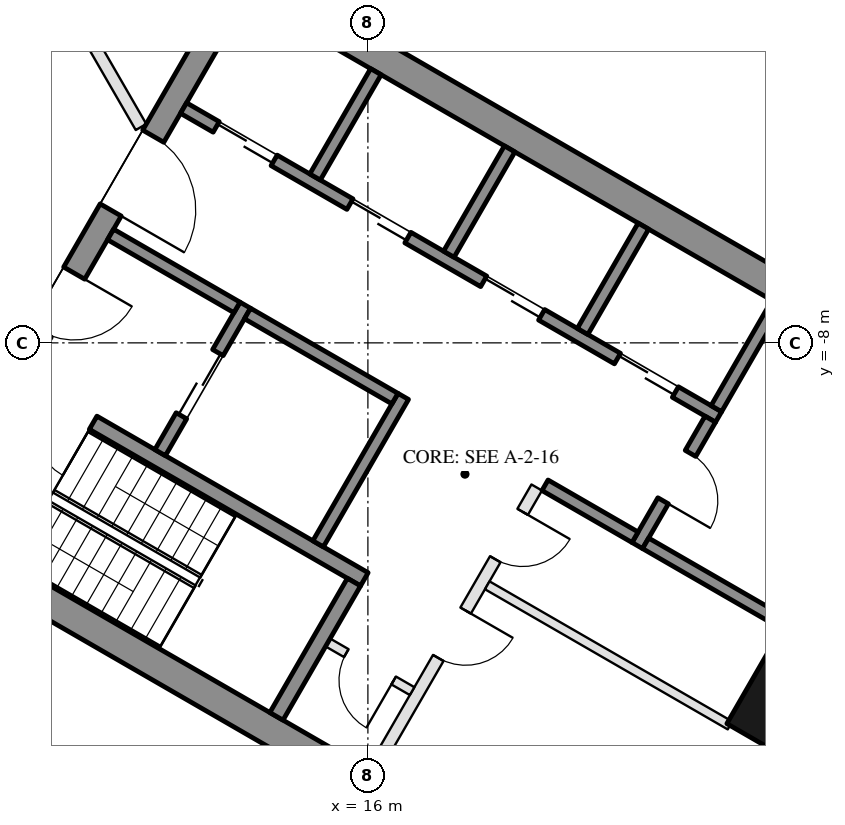
"""IFC4 building model, lengths in metres.
Left out: names, types, materials, properties, quantities, classifications, styles, units other than length and angle.
Written with IfcOpenShell. Run it as: python <this file> out.ifc"""

import sys

from ifc_helpers import new_model, si_unit, direction, frame, frame_2d, origin, origin_2d, place, context, subcontext, project, spatial, rectangle, hollow_rectangle, extrude, element, fill, save


model = new_model("IFC4")
c1 = context("Model", 3, precision=1e-05, world=origin(), true_north=direction((0.0, 1.0)))
c2 = subcontext(c1, "Body", "Model", "MODEL_VIEW")
j1 = project(units=[si_unit("LENGTHUNIT", "METRE"), si_unit("PLANEANGLEUNIT", "RADIAN")], contexts=[c1])
p1 = place(None, origin())
s1 = spatial("IfcSite", under=j1, at=p1, CompositionType="ELEMENT")
p2 = place(p1, origin())
s2 = spatial("IfcBuilding", under=s1, at=p2, CompositionType="ELEMENT")
p3 = place(p2, frame((0.0, 0.0, 79.8)))
s3 = spatial("IfcBuildingStorey", under=s2, at=p3, CompositionType="ELEMENT", Elevation=79.8)
p4 = place(p3, frame((23.643, -13.65, 0.0), z_axis=(0.0, 0.0, 1.0), x_axis=(0.5, 0.866025403784, 0.0)))
e1 = element("IfcColumn", 1, at=p4, inside=s3, PredefinedType="COLUMN", context=c2, shape_type="SweptSolid", body=[
    extrude(hollow_rectangle(XDim=2.8, YDim=2.4, WallThickness=0.07, at=origin_2d()), origin(), (0.0, 0.0, 1.0), 3.7),
])
p5 = place(p3, frame((26.257, -6.567, 0.0), z_axis=(0.0, 0.0, 1.0), x_axis=(-0.500023526245, 0.866011820475, 0.0)))
e2 = element("IfcWall", 2, at=p5, inside=s3, PredefinedType="SOLIDWALL", context=c2, shape_type="SweptSolid", body=[
    extrude(rectangle(XDim=11.816, YDim=0.35, at=frame_2d((5.908, 0.0))), origin(), (0.0, 0.0, 1.0), 3.55),
])
p6 = place(p5, frame((0.38, 0.0, 0.3)))
e3 = element("IfcOpeningElement", 3, at=p6, cuts=e2, PredefinedType="OPENING", context=c2, shape_type="SweptSolid", body=[
    extrude(rectangle(XDim=1.7, YDim=2.65, at=frame_2d((0.85, 1.325))), frame((0.0, 0.185, 0.0), z_axis=(0.0, -1.0, 0.0), x_axis=(1.0, 0.0, 0.0)), (0.0, 0.0, 1.0), 0.37),
])
p7 = place(p5, frame((7.666, 0.0, 0.0)))
e4 = element("IfcOpeningElement", 4, at=p7, cuts=e2, PredefinedType="OPENING", context=c2, shape_type="SweptSolid", body=[
    extrude(rectangle(XDim=2.4, YDim=2.4, at=frame_2d((1.2, 1.2))), frame((0.0, 0.185, 0.0), z_axis=(0.0, -1.0, 0.0), x_axis=(1.0, 0.0, 0.0)), (0.0, 0.0, 1.0), 0.37),
])
p8 = place(p5, frame((3.865, 0.0, 0.3)))
e5 = element("IfcOpeningElement", 5, at=p8, cuts=e2, PredefinedType="OPENING", context=c2, shape_type="SweptSolid", body=[
    extrude(rectangle(XDim=1.6, YDim=2.65, at=frame_2d((0.8, 1.325))), frame((0.0, 0.185, 0.0), z_axis=(0.0, -1.0, 0.0), x_axis=(1.0, 0.0, 0.0)), (0.0, 0.0, 1.0), 0.37),
])
p9 = place(p5, frame((5.765, 0.0, 0.3)))
e6 = element("IfcOpeningElement", 6, at=p9, cuts=e2, PredefinedType="OPENING", context=c2, shape_type="SweptSolid", body=[
    extrude(rectangle(XDim=1.6, YDim=2.65, at=frame_2d((0.8, 1.325))), frame((0.0, 0.185, 0.0), z_axis=(0.0, -1.0, 0.0), x_axis=(1.0, 0.0, 0.0)), (0.0, 0.0, 1.0), 0.37),
])
for number, where, z_axis, x_axis in (
    (7, (8.547, -10.997, 0.0), (0.0, 0.0, 1.0), (0.866, -0.5, 0.0)),
    (8, (13.797, -1.903, 0.0), (0.0, 0.0, 1.0), (0.866, -0.5, 0.0)),
):
    element("IfcWall", number, at=place(p3, frame(where, z_axis=z_axis, x_axis=x_axis)), inside=s3, PredefinedType="SHEAR", context=c2, shape_type="SweptSolid", body=[
        extrude(rectangle(XDim=14.837, YDim=0.5, at=frame_2d((7.418, 0.0))), origin(), (0.0, 0.0, 1.0), 3.5),
    ])
p10 = place(p3, frame((8.845, -10.88, 0.0), z_axis=(0.0, 0.0, 1.0), x_axis=(0.500004234368, 0.866022959057, 0.0)))
e9 = element("IfcWall", 9, at=p10, inside=s3, PredefinedType="SHEAR", context=c2, shape_type="SweptSolid", body=[
    extrude(rectangle(XDim=10.0, YDim=0.4, at=frame_2d((5.0, 0.0))), origin(), (0.0, 0.0, 1.0), 3.5),
])
p11 = place(p10, frame((3.55, 0.0, 0.0)))
e10 = element("IfcOpeningElement", 10, at=p11, cuts=e9, PredefinedType="OPENING", context=c2, shape_type="SweptSolid", body=[
    extrude(rectangle(XDim=1.1, YDim=2.1, at=frame_2d((0.55, 1.05))), frame((0.0, 0.21, 0.0), z_axis=(0.0, -1.0, 0.0), x_axis=(1.0, 0.0, 0.0)), (0.0, 0.0, 1.0), 0.42),
])
p12 = place(p10, frame((5.85, 0.0, 0.0)))
e11 = element("IfcOpeningElement", 11, at=p12, cuts=e9, PredefinedType="OPENING", context=c2, shape_type="SweptSolid", body=[
    extrude(rectangle(XDim=1.4, YDim=2.1, at=frame_2d((0.7, 1.05))), frame((0.0, 0.21, 0.0), z_axis=(0.0, -1.0, 0.0), x_axis=(1.0, 0.0, 0.0)), (0.0, 0.0, 1.0), 0.42),
])
p13 = place(p3, frame((10.356, -8.664, 0.0), z_axis=(0.0, 0.0, 1.0), x_axis=(0.866028629588, -0.499994412703, 0.0)))
e12 = element("IfcWall", 12, at=p13, inside=s3, PredefinedType="SHEAR", context=c2, shape_type="SweptSolid", body=[
    extrude(rectangle(XDim=6.45, YDim=0.25, at=frame_2d((3.225, 0.0))), origin(), (0.0, 0.0, 1.0), 3.5),
])
p14 = place(p13, frame((0.3, 0.0, 0.0)))
e13 = element("IfcOpeningElement", 13, at=p14, cuts=e12, PredefinedType="OPENING", context=c2, shape_type="SweptSolid", body=[
    extrude(rectangle(XDim=1.0, YDim=2.1, at=frame_2d((0.5, 1.05))), frame((0.0, 0.135, 0.0), z_axis=(0.0, -1.0, 0.0), x_axis=(1.0, 0.0, 0.0)), (0.0, 0.0, 1.0), 0.27),
])
p15 = place(p3, frame((14.496, -14.143, 0.0), z_axis=(0.0, 0.0, 1.0), x_axis=(0.500062241894, 0.865989465428, 0.0)))
e14 = element("IfcWall", 14, at=p15, inside=s3, PredefinedType="SHEAR", context=c2, shape_type="SweptSolid", body=[
    extrude(rectangle(XDim=2.55, YDim=0.25, at=frame_2d((1.275, 0.0))), origin(), (0.0, 0.0, 1.0), 3.5),
])
p16 = place(p3, frame((15.181, -11.305, 0.0), z_axis=(0.0, 0.0, 1.0), x_axis=(0.49994636267, 0.866056369097, 0.0)))
e15 = element("IfcWall", 15, at=p16, inside=s3, PredefinedType="SHEAR", context=c2, shape_type="SweptSolid", body=[
    extrude(rectangle(XDim=2.8, YDim=0.2, at=frame_2d((1.4, 0.0))), origin(), (0.0, 0.0, 1.0), 3.5),
])
p17 = place(p3, frame((12.583, -9.805, 0.0), z_axis=(0.0, 0.0, 1.0), x_axis=(0.49994636267, 0.866056369097, 0.0)))
e16 = element("IfcWall", 16, at=p17, inside=s3, PredefinedType="SHEAR", context=c2, shape_type="SweptSolid", body=[
    extrude(rectangle(XDim=2.8, YDim=0.2, at=frame_2d((1.4, 0.0))), origin(), (0.0, 0.0, 1.0), 3.5),
])
p18 = place(p17, frame((0.7, 0.0, 0.0)))
e17 = element("IfcOpeningElement", 17, at=p18, cuts=e16, PredefinedType="OPENING", context=c2, shape_type="SweptSolid", body=[
    extrude(rectangle(XDim=1.2, YDim=2.1, at=frame_2d((0.6, 1.05))), frame((0.0, 0.11, 0.0), z_axis=(0.0, -1.0, 0.0), x_axis=(1.0, 0.0, 0.0)), (0.0, 0.0, 1.0), 0.22),
])
p19 = place(p3, frame((11.768, -6.217, 0.0), z_axis=(0.0, 0.0, 1.0), x_axis=(0.866050077142, -0.499957262057, 0.0)))
e18 = element("IfcWall", 18, at=p19, inside=s3, PredefinedType="SHEAR", context=c2, shape_type="SweptSolid", body=[
    extrude(rectangle(XDim=2.4, YDim=0.2, at=frame_2d((1.2, 0.0))), origin(), (0.0, 0.0, 1.0), 3.5),
])
p20 = place(p3, frame((14.02, -7.517, 0.0), z_axis=(0.0, 0.0, 1.0), x_axis=(0.866034573852, -0.49998411664, 0.0)))
e19 = element("IfcWall", 19, at=p20, inside=s3, PredefinedType="SHEAR", context=c2, shape_type="SweptSolid", body=[
    extrude(rectangle(XDim=2.8, YDim=0.2, at=frame_2d((1.4, 0.0))), origin(), (0.0, 0.0, 1.0), 3.5),
])
p21 = place(p3, frame((12.968, -4.138, 0.0), z_axis=(0.0, 0.0, 1.0), x_axis=(0.866028328073, -0.49999493495, 0.0)))
e20 = element("IfcWall", 20, at=p21, inside=s3, PredefinedType="SHEAR", context=c2, shape_type="SweptSolid", body=[
    extrude(rectangle(XDim=10.16, YDim=0.2, at=frame_2d((5.08, 0.0))), origin(), (0.0, 0.0, 1.0), 3.5),
])
p22 = place(p21, frame((0.62, 0.0, 0.0)))
e21 = element("IfcOpeningElement", 21, at=p22, cuts=e20, PredefinedType="OPENING", context=c2, shape_type="SweptSolid", body=[
    extrude(rectangle(XDim=1.1, YDim=2.1, at=frame_2d((0.55, 1.05))), frame((0.0, 0.11, 0.0), z_axis=(0.0, -1.0, 0.0), x_axis=(1.0, 0.0, 0.0)), (0.0, 0.0, 1.0), 0.22),
])
p23 = place(p21, frame((3.16, 0.0, 0.0)))
e22 = element("IfcOpeningElement", 22, at=p23, cuts=e20, PredefinedType="OPENING", context=c2, shape_type="SweptSolid", body=[
    extrude(rectangle(XDim=1.1, YDim=2.1, at=frame_2d((0.55, 1.05))), frame((0.0, 0.11, 0.0), z_axis=(0.0, -1.0, 0.0), x_axis=(1.0, 0.0, 0.0)), (0.0, 0.0, 1.0), 0.22),
])
p24 = place(p21, frame((5.7, 0.0, 0.0)))
e23 = element("IfcOpeningElement", 23, at=p24, cuts=e20, PredefinedType="OPENING", context=c2, shape_type="SweptSolid", body=[
    extrude(rectangle(XDim=1.1, YDim=2.1, at=frame_2d((0.55, 1.05))), frame((0.0, 0.11, 0.0), z_axis=(0.0, -1.0, 0.0), x_axis=(1.0, 0.0, 0.0)), (0.0, 0.0, 1.0), 0.22),
])
p25 = place(p21, frame((8.24, 0.0, 0.0)))
e24 = element("IfcOpeningElement", 24, at=p25, cuts=e20, PredefinedType="OPENING", context=c2, shape_type="SweptSolid", body=[
    extrude(rectangle(XDim=1.1, YDim=2.1, at=frame_2d((0.55, 1.05))), frame((0.0, 0.11, 0.0), z_axis=(0.0, -1.0, 0.0), x_axis=(1.0, 0.0, 0.0)), (0.0, 0.0, 1.0), 0.22),
])
p26 = place(p3, frame((20.43, -11.333, 0.0), z_axis=(0.0, 0.0, 1.0), x_axis=(0.500001309137, 0.866024647952, 0.0)))
e25 = element("IfcWall", 25, at=p26, inside=s3, PredefinedType="SHEAR", context=c2, shape_type="SweptSolid", body=[
    extrude(rectangle(XDim=2.4, YDim=0.2, at=frame_2d((1.2, 0.0))), origin(), (0.0, 0.0, 1.0), 3.5),
])
p27 = place(p26, frame((0.85, 0.0, 0.0)))
e26 = element("IfcOpeningElement", 26, at=p27, cuts=e25, PredefinedType="OPENING", context=c2, shape_type="SweptSolid", body=[
    extrude(rectangle(XDim=0.9, YDim=2.1, at=frame_2d((0.45, 1.05))), frame((0.0, 0.11, 0.0), z_axis=(0.0, -1.0, 0.0), x_axis=(1.0, 0.0, 0.0)), (0.0, 0.0, 1.0), 0.22),
])
p28 = place(p3, frame((18.913, -10.342, 0.0), z_axis=(0.0, 0.0, 1.0), x_axis=(0.866038183914, -0.499977863513, 0.0)))
e27 = element("IfcWall", 27, at=p28, inside=s3, PredefinedType="SHEAR", context=c2, shape_type="SweptSolid", body=[
    extrude(rectangle(XDim=1.71, YDim=0.2, at=frame_2d((0.855, 0.0))), origin(), (0.0, 0.0, 1.0), 3.5),
])
for number, where, z_axis, x_axis in (
    (28, (15.131, -5.272, 0.0), (0.0, 0.0, 1.0), (0.5, 0.866, 0.0)),
    (29, (17.331, -6.542, 0.0), (0.0, 0.0, 1.0), (0.5, 0.866, 0.0)),
    (30, (19.531, -7.812, 0.0), (0.0, 0.0, 1.0), (0.5, 0.866, 0.0)),
    (31, (21.73, -9.082, 0.0), (0.0, 0.0, 1.0), (0.5, 0.866, 0.0)),
):
    element("IfcWall", number, at=place(p3, frame(where, z_axis=z_axis, x_axis=x_axis)), inside=s3, PredefinedType="SHEAR", context=c2, shape_type="SweptSolid", body=[
        extrude(rectangle(XDim=2.0, YDim=0.2, at=frame_2d((1.0, 0.0))), origin(), (0.0, 0.0, 1.0), 3.5),
    ])
p29 = place(p3, frame((20.567, -11.297, 0.0), z_axis=(0.0, 0.0, 1.0), x_axis=(0.866060851709, -0.499938597367, 0.0)))
e32 = element("IfcWall", 32, at=p29, inside=s3, PredefinedType="SHEAR", context=c2, shape_type="SweptSolid", body=[
    extrude(rectangle(XDim=2.64, YDim=0.2, at=frame_2d((1.32, 0.0))), origin(), (0.0, 0.0, 1.0), 3.5),
])
p30 = place(p3, frame((16.076, -15.055, 0.0), z_axis=(0.0, 0.0, 1.0), x_axis=(0.499995103361, 0.866028230842, 0.0)))
e33 = element("IfcWall", 33, at=p30, inside=s3, PredefinedType="PARTITIONING", context=c2, shape_type="SweptSolid", body=[
    extrude(rectangle(XDim=5.4, YDim=0.2, at=frame_2d((2.7, 0.0))), origin(), (0.0, 0.0, 1.0), 3.5),
])
p31 = place(p30, frame((2.163, 0.0, 0.0)))
e34 = element("IfcOpeningElement", 34, at=p31, cuts=e33, PredefinedType="OPENING", context=c2, shape_type="SweptSolid", body=[
    extrude(rectangle(XDim=0.9, YDim=2.1, at=frame_2d((0.45, 1.05))), frame((0.0, 0.11, 0.0), z_axis=(0.0, -1.0, 0.0), x_axis=(1.0, 0.0, 0.0)), (0.0, 0.0, 1.0), 0.22),
])
p32 = place(p30, frame((4.038, 0.0, 0.0)))
e35 = element("IfcOpeningElement", 35, at=p32, cuts=e33, PredefinedType="OPENING", context=c2, shape_type="SweptSolid", body=[
    extrude(rectangle(XDim=0.9, YDim=2.1, at=frame_2d((0.45, 1.05))), frame((0.0, 0.11, 0.0), z_axis=(0.0, -1.0, 0.0), x_axis=(1.0, 0.0, 0.0)), (0.0, 0.0, 1.0), 0.22),
])
p33 = place(p3, frame((15.342, -12.928, 0.0), z_axis=(0.0, 0.0, 1.0), x_axis=(0.865989903783, -0.500061482766, 0.0)))
e36 = element("IfcWall", 36, at=p33, inside=s3, PredefinedType="PARTITIONING", context=c2, shape_type="SweptSolid", body=[
    extrude(rectangle(XDim=1.6, YDim=0.15, at=frame_2d((0.8, 0.0))), origin(), (0.0, 0.0, 1.0), 3.5),
])
p34 = place(p33, frame((0.35, 0.0, 0.0)))
e37 = element("IfcOpeningElement", 37, at=p34, cuts=e36, PredefinedType="OPENING", context=c2, shape_type="SweptSolid", body=[
    extrude(rectangle(XDim=0.9, YDim=2.1, at=frame_2d((0.45, 1.05))), frame((0.0, 0.085, 0.0), z_axis=(0.0, -1.0, 0.0), x_axis=(1.0, 0.0, 0.0)), (0.0, 0.0, 1.0), 0.17),
])
p35 = place(p3, frame((17.963, -11.987, 0.0), z_axis=(0.0, 0.0, 1.0), x_axis=(0.865998608524, -0.500046407882, 0.0)))
e38 = element("IfcWall", 38, at=p35, inside=s3, PredefinedType="PARTITIONING", context=c2, shape_type="SweptSolid", body=[
    extrude(rectangle(XDim=4.61, YDim=0.15, at=frame_2d((2.305, 0.0))), origin(), (0.0, 0.0, 1.0), 3.5),
])
p36 = place(p3, frame((10.225, -0.909, 0.0), z_axis=(0.0, 0.0, 1.0), x_axis=(0.500011931275, -0.86601851515, 0.0)))
e39 = element("IfcWall", 39, at=p36, inside=s3, PredefinedType="PARTITIONING", context=c2, shape_type="SweptSolid", body=[
    extrude(rectangle(XDim=4.088, YDim=0.2, at=frame_2d((2.044, 0.0))), origin(), (0.0, 0.0, 1.0), 2.95),
])
p37 = place(p36, frame((1.544, 0.0, 0.0)))
e40 = element("IfcOpeningElement", 40, at=p37, cuts=e39, PredefinedType="OPENING", context=c2, shape_type="SweptSolid", body=[
    extrude(rectangle(XDim=1.0, YDim=2.1, at=frame_2d((0.5, 1.05))), frame((0.0, 0.11, 0.0), z_axis=(0.0, -1.0, 0.0), x_axis=(1.0, 0.0, 0.0)), (0.0, 0.0, 1.0), 0.22),
])
p38 = place(p18, origin())
e41 = element("IfcDoor", 41, at=p38, inside=s3, OperationType="DOUBLE_DOOR_SLIDING", PredefinedType="DOOR", context=c2, shape_type="SweptSolid", body=[
    extrude(rectangle(XDim=1.2, YDim=2.1, at=frame_2d((0.6, 1.05))), frame((0.0, 0.025, 0.0), z_axis=(0.0, -1.0, 0.0), x_axis=(1.0, 0.0, 0.0)), (0.0, 0.0, 1.0), 0.05),
])
fill(e17, e41)
p39 = place(p34, frame((0.9, 0.0, 0.0), z_axis=(0.0, 0.0, 1.0), x_axis=(-1.0, 0.0, 0.0)))
e42 = element("IfcDoor", 42, at=p39, inside=s3, OperationType="SINGLE_SWING_LEFT", PredefinedType="DOOR", context=c2, shape_type="SweptSolid", body=[
    extrude(rectangle(XDim=0.9, YDim=2.1, at=frame_2d((0.45, 1.05))), frame((0.0, 0.025, 0.0), z_axis=(0.0, -1.0, 0.0), x_axis=(1.0, 0.0, 0.0)), (0.0, 0.0, 1.0), 0.05),
])
fill(e37, e42)
p40 = place(p22, origin())
e43 = element("IfcDoor", 43, at=p40, inside=s3, OperationType="DOUBLE_DOOR_SLIDING", PredefinedType="DOOR", context=c2, shape_type="SweptSolid", body=[
    extrude(rectangle(XDim=1.1, YDim=2.1, at=frame_2d((0.55, 1.05))), frame((0.0, 0.025, 0.0), z_axis=(0.0, -1.0, 0.0), x_axis=(1.0, 0.0, 0.0)), (0.0, 0.0, 1.0), 0.05),
])
fill(e21, e43)
p41 = place(p23, origin())
e44 = element("IfcDoor", 44, at=p41, inside=s3, OperationType="DOUBLE_DOOR_SLIDING", PredefinedType="DOOR", context=c2, shape_type="SweptSolid", body=[
    extrude(rectangle(XDim=1.1, YDim=2.1, at=frame_2d((0.55, 1.05))), frame((0.0, 0.025, 0.0), z_axis=(0.0, -1.0, 0.0), x_axis=(1.0, 0.0, 0.0)), (0.0, 0.0, 1.0), 0.05),
])
fill(e22, e44)
p42 = place(p24, origin())
e45 = element("IfcDoor", 45, at=p42, inside=s3, OperationType="DOUBLE_DOOR_SLIDING", PredefinedType="DOOR", context=c2, shape_type="SweptSolid", body=[
    extrude(rectangle(XDim=1.1, YDim=2.1, at=frame_2d((0.55, 1.05))), frame((0.0, 0.025, 0.0), z_axis=(0.0, -1.0, 0.0), x_axis=(1.0, 0.0, 0.0)), (0.0, 0.0, 1.0), 0.05),
])
fill(e23, e45)
p43 = place(p25, origin())
e46 = element("IfcDoor", 46, at=p43, inside=s3, OperationType="DOUBLE_DOOR_SLIDING", PredefinedType="DOOR", context=c2, shape_type="SweptSolid", body=[
    extrude(rectangle(XDim=1.1, YDim=2.1, at=frame_2d((0.55, 1.05))), frame((0.0, 0.025, 0.0), z_axis=(0.0, -1.0, 0.0), x_axis=(1.0, 0.0, 0.0)), (0.0, 0.0, 1.0), 0.05),
])
fill(e24, e46)
p44 = place(p27, frame((0.9, 0.0, 0.0), z_axis=(0.0, 0.0, 1.0), x_axis=(-1.0, 0.0, 0.0)))
e47 = element("IfcDoor", 47, at=p44, inside=s3, OperationType="SINGLE_SWING_RIGHT", PredefinedType="DOOR", context=c2, shape_type="SweptSolid", body=[
    extrude(rectangle(XDim=0.9, YDim=2.1, at=frame_2d((0.45, 1.05))), frame((0.0, 0.025, 0.0), z_axis=(0.0, -1.0, 0.0), x_axis=(1.0, 0.0, 0.0)), (0.0, 0.0, 1.0), 0.05),
])
fill(e26, e47)
p45 = place(p31, frame((0.9, 0.0, 0.0), z_axis=(0.0, 0.0, 1.0), x_axis=(-1.0, 0.0, 0.0)))
e48 = element("IfcDoor", 48, at=p45, inside=s3, OperationType="SINGLE_SWING_LEFT", PredefinedType="DOOR", context=c2, shape_type="SweptSolid", body=[
    extrude(rectangle(XDim=0.9, YDim=2.1, at=frame_2d((0.45, 1.05))), frame((0.0, 0.025, 0.0), z_axis=(0.0, -1.0, 0.0), x_axis=(1.0, 0.0, 0.0)), (0.0, 0.0, 1.0), 0.05),
])
fill(e34, e48)
p46 = place(p32, frame((0.9, 0.0, 0.0), z_axis=(0.0, 0.0, 1.0), x_axis=(-1.0, 0.0, 0.0)))
e49 = element("IfcDoor", 49, at=p46, inside=s3, OperationType="SINGLE_SWING_LEFT", PredefinedType="DOOR", context=c2, shape_type="SweptSolid", body=[
    extrude(rectangle(XDim=0.9, YDim=2.1, at=frame_2d((0.45, 1.05))), frame((0.0, 0.025, 0.0), z_axis=(0.0, -1.0, 0.0), x_axis=(1.0, 0.0, 0.0)), (0.0, 0.0, 1.0), 0.05),
])
fill(e35, e49)
p47 = place(p11, frame((1.1, 0.0, 0.0), z_axis=(0.0, 0.0, 1.0), x_axis=(-1.0, 0.0, 0.0)))
e50 = element("IfcDoor", 50, at=p47, inside=s3, OperationType="SINGLE_SWING_LEFT", PredefinedType="DOOR", context=c2, shape_type="SweptSolid", body=[
    extrude(rectangle(XDim=1.1, YDim=2.1, at=frame_2d((0.55, 1.05))), frame((0.0, 0.025, 0.0), z_axis=(0.0, -1.0, 0.0), x_axis=(1.0, 0.0, 0.0)), (0.0, 0.0, 1.0), 0.05),
])
fill(e10, e50)
p48 = place(p12, frame((1.4, 0.0, 0.0), z_axis=(0.0, 0.0, 1.0), x_axis=(-1.0, 0.0, 0.0)))
e51 = element("IfcDoor", 51, at=p48, inside=s3, OperationType="DOUBLE_DOOR_SINGLE_SWING", PredefinedType="DOOR", context=c2, shape_type="SweptSolid", body=[
    extrude(rectangle(XDim=1.4, YDim=2.1, at=frame_2d((0.7, 1.05))), frame((0.0, 0.025, 0.0), z_axis=(0.0, -1.0, 0.0), x_axis=(1.0, 0.0, 0.0)), (0.0, 0.0, 1.0), 0.05),
])
fill(e11, e51)
p49 = place(p14, frame((1.0, 0.0, 0.0), z_axis=(0.0, 0.0, 1.0), x_axis=(-1.0, 0.0, 0.0)))
e52 = element("IfcDoor", 52, at=p49, inside=s3, OperationType="SINGLE_SWING_LEFT", PredefinedType="DOOR", context=c2, shape_type="SweptSolid", body=[
    extrude(rectangle(XDim=1.0, YDim=2.1, at=frame_2d((0.5, 1.05))), frame((0.0, 0.025, 0.0), z_axis=(0.0, -1.0, 0.0), x_axis=(1.0, 0.0, 0.0)), (0.0, 0.0, 1.0), 0.05),
])
fill(e13, e52)
save(model, sys.argv[1])
